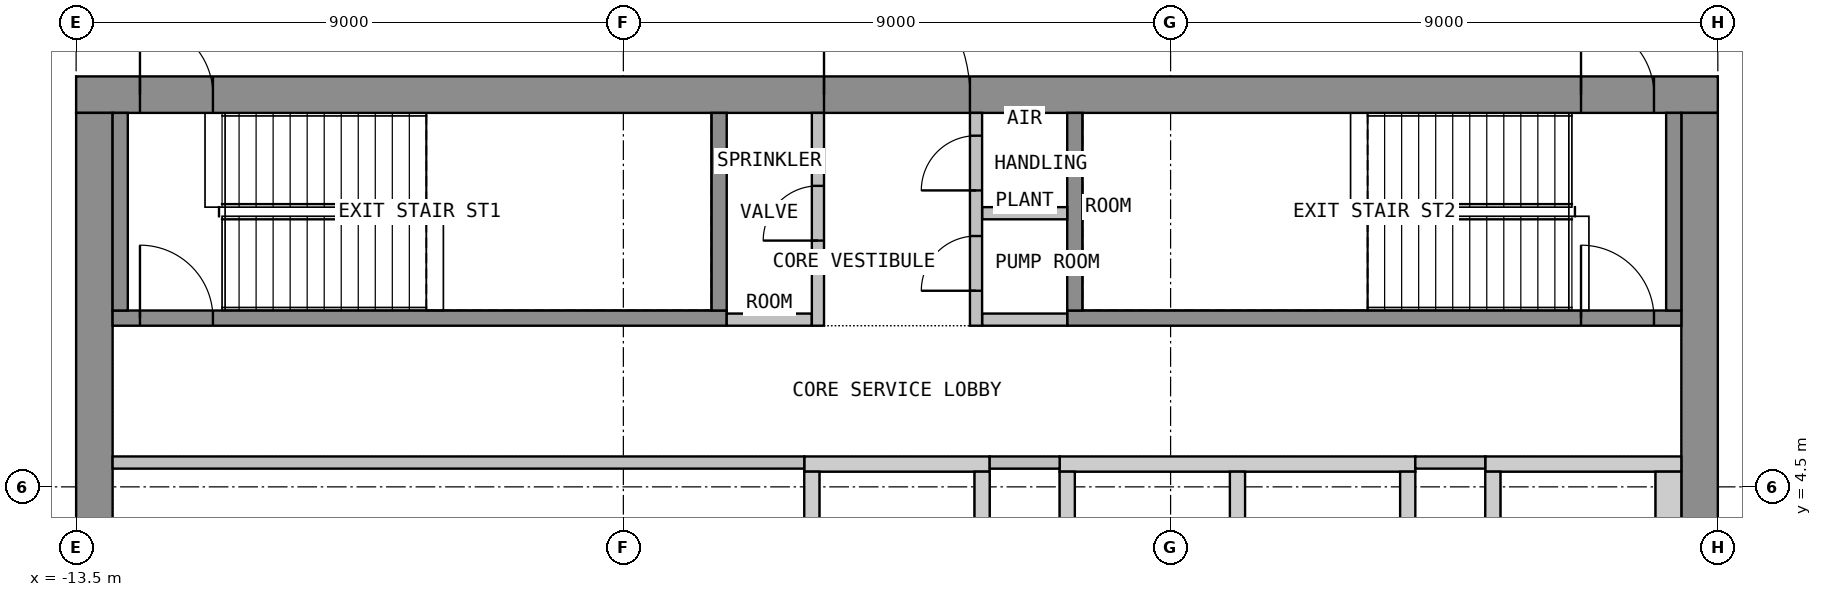
"""IFC4 building model, lengths in metres.
Left out: names, types, materials, properties, quantities, classifications, styles, units other than length and angle.
Written with IfcOpenShell. Run it as: python <this file> out.ifc"""

import sys

from ifc_helpers import new_model, si_unit, direction, frame, frame_2d, origin, place, context, subcontext, project, spatial, polyline, rectangle, outline, extrude, element, fill, save


model = new_model("IFC4")
c1 = context("Model", 3, precision=1e-05, world=origin(), true_north=direction((0.0, 1.0)))
c2 = subcontext(c1, "Body", "Model", "MODEL_VIEW")
j1 = project(units=[si_unit("LENGTHUNIT", "METRE"), si_unit("PLANEANGLEUNIT", "RADIAN")], contexts=[c1])
p1 = place(None, origin())
s1 = spatial("IfcSite", under=j1, at=p1, CompositionType="ELEMENT")
p2 = place(p1, origin())
s2 = spatial("IfcBuilding", under=s1, at=p2, CompositionType="ELEMENT")
p3 = place(p2, frame((0.0, 0.0, 282.0)))
s3 = spatial("IfcBuildingStorey", under=s2, at=p3, CompositionType="ELEMENT", Elevation=282.0)
p4 = place(p3, frame((-13.5, 10.95, 0.0), z_axis=(0.0, 0.0, 1.0), x_axis=(1.0, 0.0, 0.0)))
e1 = element("IfcWall", 1, at=p4, inside=s3, PredefinedType="SHEAR", context=c2, shape_type="SweptSolid", body=[
    extrude(rectangle(XDim=27.0, YDim=0.6, at=frame_2d((13.5, 0.0))), origin(), (0.0, 0.0, 1.0), 4.175),
])
p5 = place(p4, frame((12.3, 0.0, 0.0)))
e2 = element("IfcOpeningElement", 2, at=p5, cuts=e1, PredefinedType="OPENING", context=c2, shape_type="SweptSolid", body=[
    extrude(rectangle(XDim=2.4, YDim=2.1, at=frame_2d((1.2, 1.05))), frame((0.0, 0.31, 0.0), z_axis=(0.0, -1.0, 0.0), x_axis=(1.0, 0.0, 0.0)), (0.0, 0.0, 1.0), 0.62),
])
p6 = place(p4, frame((1.05, 0.0, 0.0)))
e3 = element("IfcOpeningElement", 3, at=p6, cuts=e1, PredefinedType="OPENING", context=c2, shape_type="SweptSolid", body=[
    extrude(rectangle(XDim=1.2, YDim=2.1, at=frame_2d((0.6, 1.05))), frame((0.0, 0.31, 0.0), z_axis=(0.0, -1.0, 0.0), x_axis=(1.0, 0.0, 0.0)), (0.0, 0.0, 1.0), 0.62),
])
p7 = place(p4, frame((24.75, 0.0, 0.0)))
e4 = element("IfcOpeningElement", 4, at=p7, cuts=e1, PredefinedType="OPENING", context=c2, shape_type="SweptSolid", body=[
    extrude(rectangle(XDim=1.2, YDim=2.1, at=frame_2d((0.6, 1.05))), frame((0.0, 0.31, 0.0), z_axis=(0.0, -1.0, 0.0), x_axis=(1.0, 0.0, 0.0)), (0.0, 0.0, 1.0), 0.62),
])
p8 = place(p3, frame((-13.2, -10.65, 0.0), z_axis=(0.0, 0.0, 1.0), x_axis=(0.0, 1.0, 0.0)))
e5 = element("IfcWall", 5, at=p8, inside=s3, PredefinedType="SHEAR", context=c2, shape_type="SweptSolid", body=[
    extrude(rectangle(XDim=21.3, YDim=0.6, at=frame_2d((10.65, 0.0))), origin(), (0.0, 0.0, 1.0), 4.175),
])
p9 = place(p8, frame((9.45, 0.0, 0.0)))
e6 = element("IfcOpeningElement", 6, at=p9, cuts=e5, PredefinedType="OPENING", context=c2, shape_type="SweptSolid", body=[
    extrude(rectangle(XDim=2.4, YDim=2.1, at=frame_2d((1.2, 1.05))), frame((0.0, 0.31, 0.0), z_axis=(0.0, -1.0, 0.0), x_axis=(1.0, 0.0, 0.0)), (0.0, 0.0, 1.0), 0.62),
])
p10 = place(p3, frame((13.2, -10.65, 0.0), z_axis=(0.0, 0.0, 1.0), x_axis=(0.0, 1.0, 0.0)))
e7 = element("IfcWall", 7, at=p10, inside=s3, PredefinedType="SHEAR", context=c2, shape_type="SweptSolid", body=[
    extrude(rectangle(XDim=21.3, YDim=0.6, at=frame_2d((10.65, 0.0))), origin(), (0.0, 0.0, 1.0), 4.175),
])
p11 = place(p10, frame((9.45, 0.0, 0.0)))
e8 = element("IfcOpeningElement", 8, at=p11, cuts=e7, PredefinedType="OPENING", context=c2, shape_type="SweptSolid", body=[
    extrude(rectangle(XDim=2.4, YDim=2.1, at=frame_2d((1.2, 1.05))), frame((0.0, 0.31, 0.0), z_axis=(0.0, -1.0, 0.0), x_axis=(1.0, 0.0, 0.0)), (0.0, 0.0, 1.0), 0.62),
])
p12 = place(p3, origin())
e9 = element("IfcWall", 9, at=p12, inside=s3, PredefinedType="SHEAR", context=c2, shape_type="SweptSolid", body=[
    extrude(outline(polyline([(-1.525, 4.75), (1.525, 4.75), (1.525, 5.0), (-1.525, 5.0), (-1.525, 4.75)])), origin(), (0.0, 0.0, 1.0), 4.175),
])
p13 = place(p3, origin())
e10 = element("IfcWall", 10, at=p13, inside=s3, PredefinedType="SHEAR", context=c2, shape_type="SweptSolid", body=[
    extrude(outline(polyline([(2.675, 4.75), (8.525, 4.75), (8.525, 5.0), (2.675, 5.0), (2.675, 4.75)])), origin(), (0.0, 0.0, 1.0), 4.175),
])
p14 = place(p3, origin())
e11 = element("IfcWall", 11, at=p14, inside=s3, PredefinedType="SHEAR", context=c2, shape_type="SweptSolid", body=[
    extrude(outline(polyline([(9.675, 4.75), (12.9, 4.75), (12.9, 5.0), (9.675, 5.0), (9.675, 4.75)])), origin(), (0.0, 0.0, 1.0), 4.175),
])
p15 = place(p3, origin())
e12 = element("IfcWall", 12, at=p15, inside=s3, PredefinedType="SHEAR", context=c2, shape_type="SweptSolid", body=[
    extrude(outline(polyline([(-1.525, 2.05), (-1.275, 2.05), (-1.275, 4.75), (-1.525, 4.75), (-1.525, 2.05)])), origin(), (0.0, 0.0, 1.0), 4.175),
])
p16 = place(p3, origin())
e13 = element("IfcWall", 13, at=p16, inside=s3, PredefinedType="SHEAR", context=c2, shape_type="SweptSolid", body=[
    extrude(outline(polyline([(1.275, 2.05), (1.525, 2.05), (1.525, 4.75), (1.275, 4.75), (1.275, 2.05)])), origin(), (0.0, 0.0, 1.0), 4.175),
])
p17 = place(p3, origin())
e14 = element("IfcWall", 14, at=p17, inside=s3, PredefinedType="SHEAR", context=c2, shape_type="SweptSolid", body=[
    extrude(outline(polyline([(2.675, 2.05), (2.925, 2.05), (2.925, 4.75), (2.675, 4.75), (2.675, 2.05)])), origin(), (0.0, 0.0, 1.0), 4.175),
])
p18 = place(p3, origin())
e15 = element("IfcWall", 15, at=p18, inside=s3, PredefinedType="SHEAR", context=c2, shape_type="SweptSolid", body=[
    extrude(outline(polyline([(5.475, 2.05), (5.725, 2.05), (5.725, 4.75), (5.475, 4.75), (5.475, 2.05)])), origin(), (0.0, 0.0, 1.0), 4.175),
])
p19 = place(p3, origin())
e16 = element("IfcWall", 16, at=p19, inside=s3, PredefinedType="SHEAR", context=c2, shape_type="SweptSolid", body=[
    extrude(outline(polyline([(8.275, 2.05), (8.525, 2.05), (8.525, 4.75), (8.275, 4.75), (8.275, 2.05)])), origin(), (0.0, 0.0, 1.0), 4.175),
])
p20 = place(p3, origin())
e17 = element("IfcWall", 17, at=p20, inside=s3, PredefinedType="SHEAR", context=c2, shape_type="SweptSolid", body=[
    extrude(outline(polyline([(9.675, 2.05), (9.925, 2.05), (9.925, 4.75), (9.675, 4.75), (9.675, 2.05)])), origin(), (0.0, 0.0, 1.0), 4.175),
])
p21 = place(p3, origin())
e18 = element("IfcWall", 18, at=p21, inside=s3, PredefinedType="SHEAR", context=c2, shape_type="SweptSolid", body=[
    extrude(outline(polyline([(12.475, 2.05), (12.9, 2.05), (12.9, 4.75), (12.475, 4.75), (12.475, 2.05)])), origin(), (0.0, 0.0, 1.0), 4.175),
])
p22 = place(p3, frame((-12.9, 7.275, 0.0), z_axis=(0.0, 0.0, 1.0), x_axis=(1.0, 0.0, 0.0)))
e19 = element("IfcWall", 19, at=p22, inside=s3, PredefinedType="SHEAR", context=c2, shape_type="SweptSolid", body=[
    extrude(rectangle(XDim=10.1, YDim=0.25, at=frame_2d((5.05, 0.0))), origin(), (0.0, 0.0, 1.0), 4.175),
])
p23 = place(p22, frame((0.45, 0.0, 0.0)))
e20 = element("IfcOpeningElement", 20, at=p23, cuts=e19, PredefinedType="OPENING", context=c2, shape_type="SweptSolid", body=[
    extrude(rectangle(XDim=1.2, YDim=2.1, at=frame_2d((0.6, 1.05))), frame((0.0, 0.135, 0.0), z_axis=(0.0, -1.0, 0.0), x_axis=(1.0, 0.0, 0.0)), (0.0, 0.0, 1.0), 0.27),
])
for number, where, z_axis, x_axis in (
    (21, (-12.775, 7.4, 0.0), (0.0, 0.0, 1.0), (0.0, 1.0, 0.0)),
    (22, (-2.925, 7.4, 0.0), (0.0, 0.0, 1.0), (0.0, 1.0, 0.0)),
):
    element("IfcWall", number, at=place(p3, frame(where, z_axis=z_axis, x_axis=x_axis)), inside=s3, PredefinedType="SHEAR", context=c2, shape_type="SweptSolid", body=[
        extrude(rectangle(XDim=3.25, YDim=0.25, at=frame_2d((1.625, 0.0))), origin(), (0.0, 0.0, 1.0), 4.175),
    ])
p24 = place(p3, frame((2.8, 7.275, 0.0), z_axis=(0.0, 0.0, 1.0), x_axis=(1.0, 0.0, 0.0)))
e23 = element("IfcWall", 23, at=p24, inside=s3, PredefinedType="SHEAR", context=c2, shape_type="SweptSolid", body=[
    extrude(rectangle(XDim=10.1, YDim=0.25, at=frame_2d((5.05, 0.0))), origin(), (0.0, 0.0, 1.0), 4.175),
])
p25 = place(p24, frame((8.45, 0.0, 0.0)))
e24 = element("IfcOpeningElement", 24, at=p25, cuts=e23, PredefinedType="OPENING", context=c2, shape_type="SweptSolid", body=[
    extrude(rectangle(XDim=1.2, YDim=2.1, at=frame_2d((0.6, 1.05))), frame((0.0, 0.135, 0.0), z_axis=(0.0, -1.0, 0.0), x_axis=(1.0, 0.0, 0.0)), (0.0, 0.0, 1.0), 0.27),
])
for number, where, z_axis, x_axis in (
    (25, (2.925, 7.4, 0.0), (0.0, 0.0, 1.0), (0.0, 1.0, 0.0)),
    (26, (12.775, 7.4, 0.0), (0.0, 0.0, 1.0), (0.0, 1.0, 0.0)),
):
    element("IfcWall", number, at=place(p3, frame(where, z_axis=z_axis, x_axis=x_axis)), inside=s3, PredefinedType="SHEAR", context=c2, shape_type="SweptSolid", body=[
        extrude(rectangle(XDim=3.25, YDim=0.25, at=frame_2d((1.625, 0.0))), origin(), (0.0, 0.0, 1.0), 4.175),
    ])
for number, where, z_axis, x_axis in (
    (27, (-2.8, 7.25, 0.0), (0.0, 0.0, 1.0), (1.0, 0.0, 0.0)),
    (28, (1.4, 7.25, 0.0), (0.0, 0.0, 1.0), (1.0, 0.0, 0.0)),
    (29, (1.4, 9.0, 0.0), (0.0, 0.0, 1.0), (1.0, 0.0, 0.0)),
):
    element("IfcWall", number, at=place(p3, frame(where, z_axis=z_axis, x_axis=x_axis)), inside=s3, PredefinedType="PARTITIONING", context=c2, shape_type="SweptSolid", body=[
        extrude(rectangle(XDim=1.4, YDim=0.2, at=frame_2d((0.7, 0.0))), origin(), (0.0, 0.0, 1.0), 4.175),
    ])
p26 = place(p3, frame((-1.3, 7.15, 0.0), z_axis=(0.0, 0.0, 1.0), x_axis=(0.0, 1.0, 0.0)))
e30 = element("IfcWall", 30, at=p26, inside=s3, PredefinedType="PARTITIONING", context=c2, shape_type="SweptSolid", body=[
    extrude(rectangle(XDim=3.5, YDim=0.2, at=frame_2d((1.75, 0.0))), origin(), (0.0, 0.0, 1.0), 4.175),
])
p27 = place(p26, frame((1.4, 0.0, 0.0)))
e31 = element("IfcOpeningElement", 31, at=p27, cuts=e30, PredefinedType="OPENING", context=c2, shape_type="SweptSolid", body=[
    extrude(rectangle(XDim=0.9, YDim=2.1, at=frame_2d((0.45, 1.05))), frame((0.0, 0.11, 0.0), z_axis=(0.0, -1.0, 0.0), x_axis=(1.0, 0.0, 0.0)), (0.0, 0.0, 1.0), 0.22),
])
p28 = place(p3, frame((1.3, 7.15, 0.0), z_axis=(0.0, 0.0, 1.0), x_axis=(0.0, 1.0, 0.0)))
e32 = element("IfcWall", 32, at=p28, inside=s3, PredefinedType="PARTITIONING", context=c2, shape_type="SweptSolid", body=[
    extrude(rectangle(XDim=3.5, YDim=0.2, at=frame_2d((1.75, 0.0))), origin(), (0.0, 0.0, 1.0), 4.175),
])
p29 = place(p28, frame((0.575, 0.0, 0.0)))
e33 = element("IfcOpeningElement", 33, at=p29, cuts=e32, PredefinedType="OPENING", context=c2, shape_type="SweptSolid", body=[
    extrude(rectangle(XDim=0.9, YDim=2.1, at=frame_2d((0.45, 1.05))), frame((0.0, 0.11, 0.0), z_axis=(0.0, -1.0, 0.0), x_axis=(1.0, 0.0, 0.0)), (0.0, 0.0, 1.0), 0.22),
])
p30 = place(p28, frame((2.225, 0.0, 0.0)))
e34 = element("IfcOpeningElement", 34, at=p30, cuts=e32, PredefinedType="OPENING", context=c2, shape_type="SweptSolid", body=[
    extrude(rectangle(XDim=0.9, YDim=2.1, at=frame_2d((0.45, 1.05))), frame((0.0, 0.11, 0.0), z_axis=(0.0, -1.0, 0.0), x_axis=(1.0, 0.0, 0.0)), (0.0, 0.0, 1.0), 0.22),
])
p31 = place(p3, frame((-12.9, 4.9, 0.0), z_axis=(0.0, 0.0, 1.0), x_axis=(1.0, 0.0, 0.0)))
e35 = element("IfcWall", 35, at=p31, inside=s3, PredefinedType="PARTITIONING", context=c2, shape_type="SweptSolid", body=[
    extrude(rectangle(XDim=11.375, YDim=0.2, at=frame_2d((5.688, 0.0))), origin(), (0.0, 0.0, 1.0), 4.175),
])
for number, where, z_axis, x_axis in (
    (36, (1.525, 4.9, 0.0), (0.0, 0.0, 1.0), (1.0, 0.0, 0.0)),
    (37, (8.525, 4.9, 0.0), (0.0, 0.0, 1.0), (1.0, 0.0, 0.0)),
):
    element("IfcWall", number, at=place(p3, frame(where, z_axis=z_axis, x_axis=x_axis)), inside=s3, PredefinedType="PARTITIONING", context=c2, shape_type="SweptSolid", body=[
        extrude(rectangle(XDim=1.15, YDim=0.2, at=frame_2d((0.575, 0.0))), origin(), (0.0, 0.0, 1.0), 4.175),
    ])
p32 = place(p5, origin())
e38 = element("IfcDoor", 38, at=p32, inside=s3, OperationType="DOUBLE_DOOR_DOUBLE_SWING", PredefinedType="DOOR", context=c2, shape_type="SweptSolid", body=[
    extrude(rectangle(XDim=2.4, YDim=2.1, at=frame_2d((1.2, 1.05))), frame((0.0, 0.025, 0.0), z_axis=(0.0, -1.0, 0.0), x_axis=(1.0, 0.0, 0.0)), (0.0, 0.0, 1.0), 0.05),
])
fill(e2, e38)
p33 = place(p6, origin())
e39 = element("IfcDoor", 39, at=p33, inside=s3, OperationType="SINGLE_SWING_RIGHT", PredefinedType="DOOR", context=c2, shape_type="SweptSolid", body=[
    extrude(rectangle(XDim=1.2, YDim=2.1, at=frame_2d((0.6, 1.05))), frame((0.0, 0.025, 0.0), z_axis=(0.0, -1.0, 0.0), x_axis=(1.0, 0.0, 0.0)), (0.0, 0.0, 1.0), 0.05),
])
fill(e3, e39)
p34 = place(p7, origin())
e40 = element("IfcDoor", 40, at=p34, inside=s3, OperationType="SINGLE_SWING_RIGHT", PredefinedType="DOOR", context=c2, shape_type="SweptSolid", body=[
    extrude(rectangle(XDim=1.2, YDim=2.1, at=frame_2d((0.6, 1.05))), frame((0.0, 0.025, 0.0), z_axis=(0.0, -1.0, 0.0), x_axis=(1.0, 0.0, 0.0)), (0.0, 0.0, 1.0), 0.05),
])
fill(e4, e40)
p35 = place(p23, origin())
e41 = element("IfcDoor", 41, at=p35, inside=s3, OperationType="SINGLE_SWING_LEFT", PredefinedType="DOOR", context=c2, shape_type="SweptSolid", body=[
    extrude(rectangle(XDim=1.2, YDim=2.1, at=frame_2d((0.6, 1.05))), frame((0.0, 0.025, 0.0), z_axis=(0.0, -1.0, 0.0), x_axis=(1.0, 0.0, 0.0)), (0.0, 0.0, 1.0), 0.05),
])
fill(e20, e41)
p36 = place(p25, origin())
e42 = element("IfcDoor", 42, at=p36, inside=s3, OperationType="SINGLE_SWING_LEFT", PredefinedType="DOOR", context=c2, shape_type="SweptSolid", body=[
    extrude(rectangle(XDim=1.2, YDim=2.1, at=frame_2d((0.6, 1.05))), frame((0.0, 0.025, 0.0), z_axis=(0.0, -1.0, 0.0), x_axis=(1.0, 0.0, 0.0)), (0.0, 0.0, 1.0), 0.05),
])
fill(e24, e42)
p37 = place(p27, origin())
e43 = element("IfcDoor", 43, at=p37, inside=s3, OperationType="SINGLE_SWING_LEFT", PredefinedType="DOOR", context=c2, shape_type="SweptSolid", body=[
    extrude(rectangle(XDim=0.9, YDim=2.1, at=frame_2d((0.45, 1.05))), frame((0.0, 0.025, 0.0), z_axis=(0.0, -1.0, 0.0), x_axis=(1.0, 0.0, 0.0)), (0.0, 0.0, 1.0), 0.05),
])
fill(e31, e43)
p38 = place(p29, origin())
e44 = element("IfcDoor", 44, at=p38, inside=s3, OperationType="SINGLE_SWING_LEFT", PredefinedType="DOOR", context=c2, shape_type="SweptSolid", body=[
    extrude(rectangle(XDim=0.9, YDim=2.1, at=frame_2d((0.45, 1.05))), frame((0.0, 0.025, 0.0), z_axis=(0.0, -1.0, 0.0), x_axis=(1.0, 0.0, 0.0)), (0.0, 0.0, 1.0), 0.05),
])
fill(e33, e44)
p39 = place(p30, origin())
e45 = element("IfcDoor", 45, at=p39, inside=s3, OperationType="SINGLE_SWING_LEFT", PredefinedType="DOOR", context=c2, shape_type="SweptSolid", body=[
    extrude(rectangle(XDim=0.9, YDim=2.1, at=frame_2d((0.45, 1.05))), frame((0.0, 0.025, 0.0), z_axis=(0.0, -1.0, 0.0), x_axis=(1.0, 0.0, 0.0)), (0.0, 0.0, 1.0), 0.05),
])
fill(e34, e45)
save(model, sys.argv[1])
